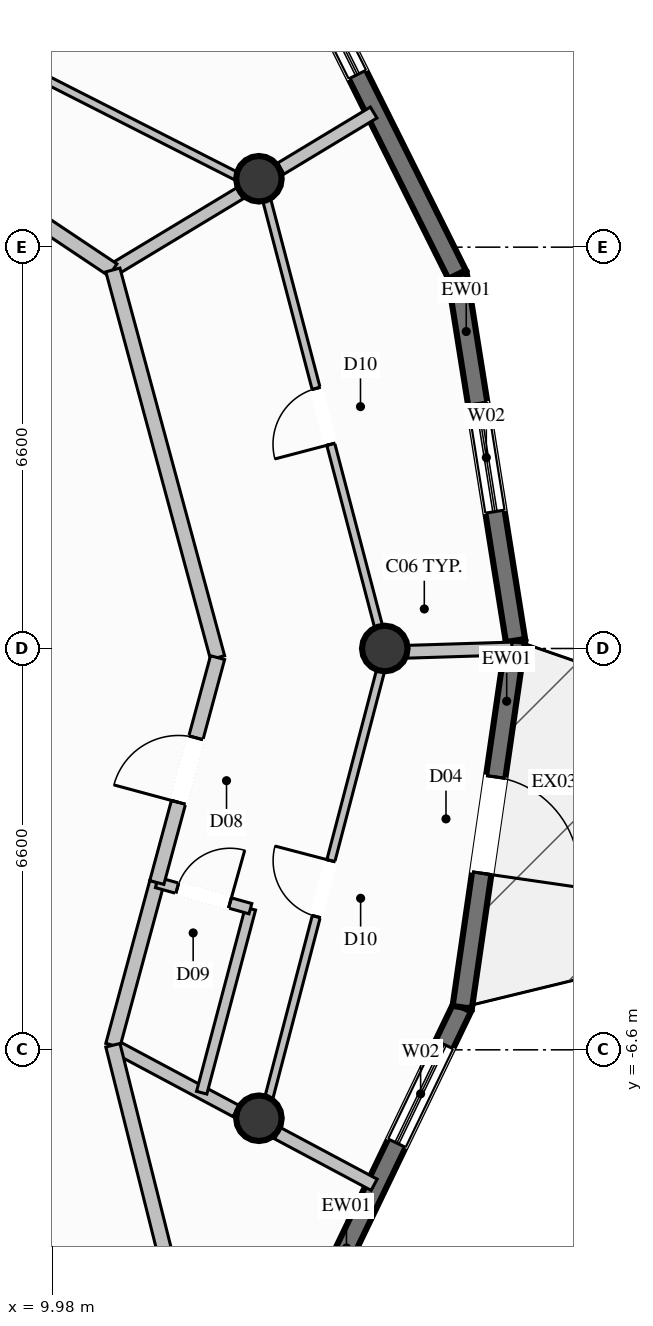
"""IFC4 building model, lengths in metres.
Left out: names, types, materials, properties, quantities, classifications, styles, units other than length and angle.
Written with IfcOpenShell. Run it as: python <this file> out.ifc"""

import sys

from ifc_helpers import new_model, si_unit, direction, frame, frame_2d, origin, origin_2d, place, context, subcontext, project, spatial, rectangle, circle, extrude, element, fill, save


model = new_model("IFC4")
c1 = context("Model", 3, precision=1e-05, world=origin(), true_north=direction((0.0, 1.0)))
c2 = subcontext(c1, "Body", "Model", "MODEL_VIEW")
j1 = project(units=[si_unit("LENGTHUNIT", "METRE"), si_unit("PLANEANGLEUNIT", "RADIAN")], contexts=[c1])
p1 = place(None, origin())
s1 = spatial("IfcSite", under=j1, at=p1, CompositionType="ELEMENT")
p2 = place(p1, origin())
s2 = spatial("IfcBuilding", under=s1, at=p2, CompositionType="ELEMENT")
p3 = place(p2, frame((0.0, 0.0, 278.2)))
s3 = spatial("IfcBuildingStorey", under=s2, at=p3, CompositionType="ELEMENT", Elevation=278.2)
for number, where, z_axis, x_axis in (
    (1, (15.45, 0.0, 0.0), (0.0, 0.0, 1.0), (1.0, 0.0, 0.0)),
    (2, (13.38, 7.725, 0.0), (0.0, 0.0, 1.0), (1.0, 0.0, 0.0)),
    (3, (13.38, -7.725, 0.0), (0.0, 0.0, 1.0), (1.0, 0.0, 0.0)),
):
    element("IfcColumn", number, at=place(p3, frame(where, z_axis=z_axis, x_axis=x_axis)), inside=s3, PredefinedType="COLUMN", context=c2, shape_type="SweptSolid", body=[
        extrude(circle(Radius=0.375, at=origin_2d()), origin(), (0.0, 0.0, 1.0), 3.8),
    ])
p4 = place(p3, frame((16.724, -5.901, 0.0), z_axis=(0.0, 0.0, 1.0), x_axis=(-0.433611899422, -0.901099728487, 0.0)))
e4 = element("IfcWall", 4, at=p4, inside=s3, PredefinedType="SOLIDWALL", context=c2, shape_type="SweptSolid", body=[
    extrude(rectangle(XDim=6.054, YDim=0.32, at=frame_2d((3.027, 0.0))), origin(), (0.0, 0.0, 1.0), 3.57),
])
p5 = place(p4, frame((0.679, 0.0, 0.35)))
e5 = element("IfcOpeningElement", 5, at=p5, cuts=e4, PredefinedType="OPENING", context=c2, shape_type="SweptSolid", body=[
    extrude(rectangle(XDim=1.8, YDim=2.6, at=frame_2d((0.9, 1.3))), frame((0.0, 0.17, 0.0), z_axis=(0.0, -1.0, 0.0), x_axis=(1.0, 0.0, 0.0)), (0.0, 0.0, 1.0), 0.34),
])
p6 = place(p3, frame((17.6, 0.131, 0.0), z_axis=(0.0, 0.0, 1.0), x_axis=(-0.14371448036, -0.989619193496, 0.0)))
e6 = element("IfcWall", 6, at=p6, inside=s3, PredefinedType="SOLIDWALL", context=c2, shape_type="SweptSolid", body=[
    extrude(rectangle(XDim=6.095, YDim=0.32, at=frame_2d((3.048, 0.0))), origin(), (0.0, 0.0, 1.0), 3.57),
])
p7 = place(p6, frame((2.267, 0.0, 0.0)))
e7 = element("IfcOpeningElement", 7, at=p7, cuts=e6, PredefinedType="OPENING", context=c2, shape_type="SweptSolid", body=[
    extrude(rectangle(XDim=1.6, YDim=2.3, at=frame_2d((0.8, 1.15))), frame((0.0, 0.17, 0.0), z_axis=(0.0, -1.0, 0.0), x_axis=(1.0, 0.0, 0.0)), (0.0, 0.0, 1.0), 0.34),
])
p8 = place(p3, frame((16.64, 6.15, 0.0), z_axis=(0.0, 0.0, 1.0), x_axis=(0.157542114764, -0.987512269329, 0.0)))
e8 = element("IfcWall", 8, at=p8, inside=s3, PredefinedType="SOLIDWALL", context=c2, shape_type="SweptSolid", body=[
    extrude(rectangle(XDim=6.095, YDim=0.32, at=frame_2d((3.047, 0.0))), origin(), (0.0, 0.0, 1.0), 3.57),
])
p9 = place(p8, frame((2.148, 0.0, 0.35)))
e9 = element("IfcOpeningElement", 9, at=p9, cuts=e8, PredefinedType="OPENING", context=c2, shape_type="SweptSolid", body=[
    extrude(rectangle(XDim=1.8, YDim=2.6, at=frame_2d((0.9, 1.3))), frame((0.0, 0.17, 0.0), z_axis=(0.0, -1.0, 0.0), x_axis=(1.0, 0.0, 0.0)), (0.0, 0.0, 1.0), 0.34),
])
p10 = place(p3, frame((13.939, 11.567, 0.0), z_axis=(0.0, 0.0, 1.0), x_axis=(0.44621303713, -0.894926771024, 0.0)))
e10 = element("IfcWall", 10, at=p10, inside=s3, PredefinedType="SOLIDWALL", context=c2, shape_type="SweptSolid", body=[
    extrude(rectangle(XDim=6.053, YDim=0.32, at=frame_2d((3.026, 0.0))), origin(), (0.0, 0.0, 1.0), 3.57),
])
p11 = place(p10, frame((0.578, 0.0, 0.35)))
e11 = element("IfcOpeningElement", 11, at=p11, cuts=e10, PredefinedType="OPENING", context=c2, shape_type="SweptSolid", body=[
    extrude(rectangle(XDim=1.8, YDim=2.6, at=frame_2d((0.9, 1.3))), frame((0.0, 0.17, 0.0), z_axis=(0.0, -1.0, 0.0), x_axis=(1.0, 0.0, 0.0)), (0.0, 0.0, 1.0), 0.34),
])
p12 = place(p3, frame((10.978, 6.225, 0.0), z_axis=(0.0, 0.0, 1.0), x_axis=(0.856173916647, 0.516687743664, 0.0)))
e12 = element("IfcWall", 12, at=p12, inside=s3, PredefinedType="PARTITIONING", context=c2, shape_type="SweptSolid", body=[
    extrude(rectangle(XDim=2.439, YDim=0.21, at=frame_2d((1.219, 0.0))), origin(), (0.0, 0.0, 1.0), 3.011),
])
p13 = place(p3, frame((13.738, 7.891, 0.0), z_axis=(0.0, 0.0, 1.0), x_axis=(0.856151167904, 0.516725437439, 0.0)))
e13 = element("IfcWall", 13, at=p13, inside=s3, PredefinedType="PARTITIONING", context=c2, shape_type="SweptSolid", body=[
    extrude(rectangle(XDim=1.786, YDim=0.21, at=frame_2d((0.893, 0.0))), origin(), (0.0, 0.0, 1.0), 3.57),
])
p14 = place(p3, frame((10.978, -6.525, 0.0), z_axis=(0.0, 0.0, 1.0), x_axis=(0.882152653626, -0.470963582138, 0.0)))
e14 = element("IfcWall", 14, at=p14, inside=s3, PredefinedType="PARTITIONING", context=c2, shape_type="SweptSolid", body=[
    extrude(rectangle(XDim=2.295, YDim=0.21, at=frame_2d((1.148, 0.0))), origin(), (0.0, 0.0, 1.0), 3.011),
])
p15 = place(p3, frame((13.688, -7.972, 0.0), z_axis=(0.0, 0.0, 1.0), x_axis=(0.882165026319, -0.470940406358, 0.0)))
e15 = element("IfcWall", 15, at=p15, inside=s3, PredefinedType="PARTITIONING", context=c2, shape_type="SweptSolid", body=[
    extrude(rectangle(XDim=1.799, YDim=0.21, at=frame_2d((0.899, 0.0))), origin(), (0.0, 0.0, 1.0), 3.57),
])
p16 = place(p3, frame((7.35, 8.65, 0.0), z_axis=(0.0, 0.0, 1.0), x_axis=(0.831395547998, -0.555681062094, 0.0)))
e16 = element("IfcWall", 16, at=p16, inside=s3, PredefinedType="PARTITIONING", context=c2, shape_type="SweptSolid", body=[
    extrude(rectangle(XDim=4.364, YDim=0.24, at=frame_2d((2.182, 0.0))), origin(), (0.0, 0.0, 1.0), 3.57),
])
p17 = place(p16, frame((1.632, 0.0, 0.0)))
e17 = element("IfcOpeningElement", 17, at=p17, cuts=e16, PredefinedType="OPENING", context=c2, shape_type="SweptSolid", body=[
    extrude(rectangle(XDim=1.1, YDim=2.3, at=frame_2d((0.55, 1.15))), frame((0.0, 0.13, 0.0), z_axis=(0.0, -1.0, 0.0), x_axis=(1.0, 0.0, 0.0)), (0.0, 0.0, 1.0), 0.26),
])
p18 = place(p3, frame((0.0, 14.378, 0.0), z_axis=(0.0, 0.0, 1.0), x_axis=(0.891513801847, -0.452993533195, 0.0)))
e18 = element("IfcWall", 18, at=p18, inside=s3, PredefinedType="PARTITIONING", context=c2, shape_type="SweptSolid", body=[
    extrude(rectangle(XDim=14.912, YDim=0.135, at=frame_2d((7.456, 0.0))), origin(), (0.0, 0.0, 1.0), 3.011),
])
p19 = place(p18, frame((6.981, 0.0, 0.0)))
e19 = element("IfcOpeningElement", 19, at=p19, cuts=e18, PredefinedType="OPENING", context=c2, shape_type="SweptSolid", body=[
    extrude(rectangle(XDim=0.95, YDim=2.1, at=frame_2d((0.475, 1.05))), frame((0.0, 0.078, 0.0), z_axis=(0.0, -1.0, 0.0), x_axis=(1.0, 0.0, 0.0)), (0.0, 0.0, 1.0), 0.155),
])
p20 = place(p3, frame((10.978, -6.525, 0.0), z_axis=(0.0, 0.0, 1.0), x_axis=(0.260702780503, 0.965419111183, 0.0)))
e20 = element("IfcWall", 20, at=p20, inside=s3, PredefinedType="PARTITIONING", context=c2, shape_type="SweptSolid", body=[
    extrude(rectangle(XDim=2.773, YDim=0.24, at=frame_2d((1.386, 0.0))), origin(), (0.0, 0.0, 1.0), 3.57),
])
p21 = place(p3, frame((12.439, -7.305, 0.0), z_axis=(0.0, 0.0, 1.0), x_axis=(0.255909710893, 0.96670068784, 0.0)))
e21 = element("IfcWall", 21, at=p21, inside=s3, PredefinedType="PLUMBINGWALL", context=c2, shape_type="SweptSolid", body=[
    extrude(rectangle(XDim=3.13, YDim=0.175, at=frame_2d((1.565, 0.0))), origin(), (0.0, 0.0, 1.0), 3.57),
])
p22 = place(p3, frame((11.701, -3.848, 0.0), z_axis=(0.0, 0.0, 1.0), x_axis=(0.962929110561, -0.269754569995, 0.0)))
e22 = element("IfcWall", 22, at=p22, inside=s3, PredefinedType="PLUMBINGWALL", context=c2, shape_type="SweptSolid", body=[
    extrude(rectangle(XDim=1.598, YDim=0.175, at=frame_2d((0.799, 0.0))), origin(), (0.0, 0.0, 1.0), 3.57),
])
p23 = place(p22, frame((0.349, 0.0, 0.0)))
e23 = element("IfcOpeningElement", 23, at=p23, cuts=e22, PredefinedType="OPENING", context=c2, shape_type="SweptSolid", body=[
    extrude(rectangle(XDim=0.9, YDim=2.1, at=frame_2d((0.45, 1.05))), frame((0.0, 0.098, 0.0), z_axis=(0.0, -1.0, 0.0), x_axis=(1.0, 0.0, 0.0)), (0.0, 0.0, 1.0), 0.195),
])
p24 = place(p3, frame((15.459, -0.065, 0.0), z_axis=(0.0, 0.0, 1.0), x_axis=(0.999513903895, 0.031176207603, 0.0)))
e24 = element("IfcWall", 24, at=p24, inside=s3, PredefinedType="PARTITIONING", context=c2, shape_type="SweptSolid", body=[
    extrude(rectangle(XDim=2.083, YDim=0.21, at=frame_2d((1.042, 0.0))), origin(), (0.0, 0.0, 1.0), 3.57),
])
p25 = place(p3, frame((12.7, -0.15, 0.0), z_axis=(0.0, 0.0, 1.0), x_axis=(-0.260760959349, 0.965403398626, 0.0)))
e25 = element("IfcWall", 25, at=p25, inside=s3, PredefinedType="PARTITIONING", context=c2, shape_type="SweptSolid", body=[
    extrude(rectangle(XDim=6.604, YDim=0.24, at=frame_2d((3.302, 0.0))), origin(), (0.0, 0.0, 1.0), 3.57),
])
p26 = place(p3, frame((11.701, -3.848, 0.0), z_axis=(0.0, 0.0, 1.0), x_axis=(0.260803073576, 0.965392022348, 0.0)))
e26 = element("IfcWall", 26, at=p26, inside=s3, PredefinedType="PARTITIONING", context=c2, shape_type="SweptSolid", body=[
    extrude(rectangle(XDim=3.831, YDim=0.24, at=frame_2d((1.915, 0.0))), origin(), (0.0, 0.0, 1.0), 3.57),
])
p27 = place(p26, frame((1.365, 0.0, 0.0)))
e27 = element("IfcOpeningElement", 27, at=p27, cuts=e26, PredefinedType="OPENING", context=c2, shape_type="SweptSolid", body=[
    extrude(rectangle(XDim=1.1, YDim=2.3, at=frame_2d((0.55, 1.15))), frame((0.0, 0.13, 0.0), z_axis=(0.0, -1.0, 0.0), x_axis=(1.0, 0.0, 0.0)), (0.0, 0.0, 1.0), 0.26),
])
p28 = place(p3, frame((13.427, -7.833, 0.0), z_axis=(0.0, 0.0, 1.0), x_axis=(0.253066711185, 0.967448830528, 0.0)))
e28 = element("IfcWall", 28, at=p28, inside=s3, PredefinedType="PARTITIONING", context=c2, shape_type="SweptSolid", body=[
    extrude(rectangle(XDim=8.03, YDim=0.135, at=frame_2d((4.015, 0.0))), origin(), (0.0, 0.0, 1.0), 3.137),
])
p29 = place(p28, frame((3.54, 0.0, 0.0)))
e29 = element("IfcOpeningElement", 29, at=p29, cuts=e28, PredefinedType="OPENING", context=c2, shape_type="SweptSolid", body=[
    extrude(rectangle(XDim=0.95, YDim=2.1, at=frame_2d((0.475, 1.05))), frame((0.0, 0.078, 0.0), z_axis=(0.0, -1.0, 0.0), x_axis=(1.0, 0.0, 0.0)), (0.0, 0.0, 1.0), 0.155),
])
p30 = place(p3, frame((15.459, -0.065, 0.0), z_axis=(0.0, 0.0, 1.0), x_axis=(-0.253589081107, 0.967312037526, 0.0)))
e30 = element("IfcWall", 30, at=p30, inside=s3, PredefinedType="PARTITIONING", context=c2, shape_type="SweptSolid", body=[
    extrude(rectangle(XDim=8.028, YDim=0.135, at=frame_2d((4.014, 0.0))), origin(), (0.0, 0.0, 1.0), 3.137),
])
p31 = place(p30, frame((3.539, 0.0, 0.0)))
e31 = element("IfcOpeningElement", 31, at=p31, cuts=e30, PredefinedType="OPENING", context=c2, shape_type="SweptSolid", body=[
    extrude(rectangle(XDim=0.95, YDim=2.1, at=frame_2d((0.475, 1.05))), frame((0.0, 0.078, 0.0), z_axis=(0.0, -1.0, 0.0), x_axis=(1.0, 0.0, 0.0)), (0.0, 0.0, 1.0), 0.155),
])
p32 = place(p3, frame((12.3, -11.8, 0.0), z_axis=(0.0, 0.0, 1.0), x_axis=(-0.243095426382, 0.970002378179, 0.0)))
e32 = element("IfcWall", 32, at=p32, inside=s3, PredefinedType="PARTITIONING", context=c2, shape_type="SweptSolid", body=[
    extrude(rectangle(XDim=5.438, YDim=0.24, at=frame_2d((2.719, 0.0))), origin(), (0.0, 0.0, 1.0), 3.57),
])
p33 = place(p5, origin())
e33 = element("IfcWindow", 33, at=p33, inside=s3, PartitioningType="SINGLE_PANEL", PredefinedType="WINDOW", context=c2, shape_type="SweptSolid", body=[
    extrude(rectangle(XDim=1.8, YDim=2.6, at=frame_2d((0.9, 1.3))), frame((0.0, 0.03, 0.0), z_axis=(0.0, -1.0, 0.0), x_axis=(1.0, 0.0, 0.0)), (0.0, 0.0, 1.0), 0.06),
])
fill(e5, e33)
p34 = place(p7, origin())
e34 = element("IfcDoor", 34, at=p34, inside=s3, OperationType="SINGLE_SWING_RIGHT", PredefinedType="DOOR", context=c2, shape_type="SweptSolid", body=[
    extrude(rectangle(XDim=1.6, YDim=2.3, at=frame_2d((0.8, 1.15))), frame((0.0, 0.025, 0.0), z_axis=(0.0, -1.0, 0.0), x_axis=(1.0, 0.0, 0.0)), (0.0, 0.0, 1.0), 0.05),
])
fill(e7, e34)
p35 = place(p9, origin())
e35 = element("IfcWindow", 35, at=p35, inside=s3, PartitioningType="SINGLE_PANEL", PredefinedType="WINDOW", context=c2, shape_type="SweptSolid", body=[
    extrude(rectangle(XDim=1.8, YDim=2.6, at=frame_2d((0.9, 1.3))), frame((0.0, 0.03, 0.0), z_axis=(0.0, -1.0, 0.0), x_axis=(1.0, 0.0, 0.0)), (0.0, 0.0, 1.0), 0.06),
])
fill(e9, e35)
p36 = place(p11, origin())
e36 = element("IfcWindow", 36, at=p36, inside=s3, PartitioningType="SINGLE_PANEL", PredefinedType="WINDOW", context=c2, shape_type="SweptSolid", body=[
    extrude(rectangle(XDim=1.8, YDim=2.6, at=frame_2d((0.9, 1.3))), frame((0.0, 0.03, 0.0), z_axis=(0.0, -1.0, 0.0), x_axis=(1.0, 0.0, 0.0)), (0.0, 0.0, 1.0), 0.06),
])
fill(e11, e36)
p37 = place(p23, origin())
e37 = element("IfcDoor", 37, at=p37, inside=s3, OperationType="SINGLE_SWING_RIGHT", PredefinedType="DOOR", context=c2, shape_type="SweptSolid", body=[
    extrude(rectangle(XDim=0.9, YDim=2.1, at=frame_2d((0.45, 1.05))), frame((0.0, 0.025, 0.0), z_axis=(0.0, -1.0, 0.0), x_axis=(1.0, 0.0, 0.0)), (0.0, 0.0, 1.0), 0.05),
])
fill(e23, e37)
p38 = place(p27, origin())
e38 = element("IfcDoor", 38, at=p38, inside=s3, OperationType="SINGLE_SWING_LEFT", PredefinedType="DOOR", context=c2, shape_type="SweptSolid", body=[
    extrude(rectangle(XDim=1.1, YDim=2.3, at=frame_2d((0.55, 1.15))), frame((0.0, 0.025, 0.0), z_axis=(0.0, -1.0, 0.0), x_axis=(1.0, 0.0, 0.0)), (0.0, 0.0, 1.0), 0.05),
])
fill(e27, e38)
p39 = place(p29, origin())
e39 = element("IfcDoor", 39, at=p39, inside=s3, OperationType="SINGLE_SWING_RIGHT", PredefinedType="DOOR", context=c2, shape_type="SweptSolid", body=[
    extrude(rectangle(XDim=0.95, YDim=2.1, at=frame_2d((0.475, 1.05))), frame((0.0, 0.025, 0.0), z_axis=(0.0, -1.0, 0.0), x_axis=(1.0, 0.0, 0.0)), (0.0, 0.0, 1.0), 0.05),
])
fill(e29, e39)
p40 = place(p31, origin())
e40 = element("IfcDoor", 40, at=p40, inside=s3, OperationType="SINGLE_SWING_LEFT", PredefinedType="DOOR", context=c2, shape_type="SweptSolid", body=[
    extrude(rectangle(XDim=0.95, YDim=2.1, at=frame_2d((0.475, 1.05))), frame((0.0, 0.025, 0.0), z_axis=(0.0, -1.0, 0.0), x_axis=(1.0, 0.0, 0.0)), (0.0, 0.0, 1.0), 0.05),
])
fill(e31, e40)
save(model, sys.argv[1])
